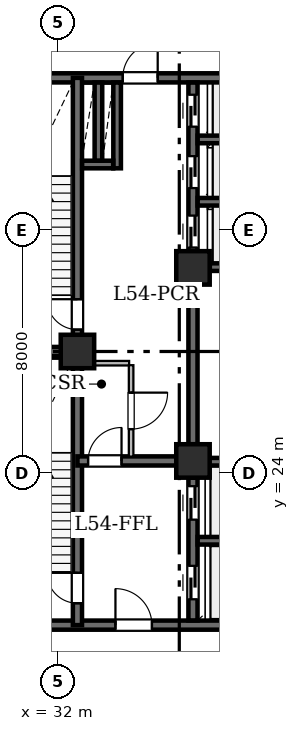
"""IFC4 building model, lengths in metres.
Left out: names, types, materials, properties, quantities, classifications, styles, units other than length and angle.
Written with IfcOpenShell. Run it as: python <this file> out.ifc"""

import sys

from ifc_helpers import new_model, si_unit, direction, frame, frame_2d, origin, origin_2d, place, context, subcontext, project, spatial, rectangle, hollow_rectangle, extrude, element, fill, save


model = new_model("IFC4")
c1 = context("Model", 3, precision=1e-05, world=origin(), true_north=direction((0.0, 1.0)))
c2 = subcontext(c1, "Body", "Model", "MODEL_VIEW")
j1 = project(units=[si_unit("LENGTHUNIT", "METRE"), si_unit("PLANEANGLEUNIT", "RADIAN")], contexts=[c1])
p1 = place(None, origin())
s1 = spatial("IfcSite", under=j1, at=p1, CompositionType="ELEMENT")
p2 = place(p1, origin())
s2 = spatial("IfcBuilding", under=s1, at=p2, CompositionType="ELEMENT")
p3 = place(p2, frame((0.0, 0.0, 211.8)))
s3 = spatial("IfcBuildingStorey", under=s2, at=p3, CompositionType="ELEMENT", Elevation=211.8)
for number, where, z_axis, x_axis in (
    (1, (32.65, 28.0, 0.0), (0.0, 0.0, 1.0), (1.0, 0.0, 0.0)),
    (2, (36.45, 24.4, 0.0), (0.0, 0.0, 1.0), (1.0, 0.0, 0.0)),
    (3, (36.45, 30.75, 0.0), (0.0, 0.0, 1.0), (1.0, 0.0, 0.0)),
):
    element("IfcColumn", number, at=place(p3, frame(where, z_axis=z_axis, x_axis=x_axis)), inside=s3, PredefinedType="COLUMN", context=c2, shape_type="SweptSolid", body=[
        extrude(hollow_rectangle(XDim=1.1, YDim=1.1, WallThickness=0.055, at=origin_2d()), origin(), (0.0, 0.0, 1.0), 5.4),
    ])
p4 = place(p3, frame((29.0, 19.0, 0.0), z_axis=(0.0, 0.0, 1.0), x_axis=(1.0, 0.0, 0.0)))
e4 = element("IfcWall", 4, at=p4, inside=s3, PredefinedType="SHEAR", context=c2, shape_type="SweptSolid", body=[
    extrude(rectangle(XDim=10.4, YDim=0.3, at=frame_2d((5.2, 0.0))), origin(), (0.0, 0.0, 1.0), 4.98),
])
p5 = place(p4, frame((4.9, 0.0, 0.0)))
e5 = element("IfcOpeningElement", 5, at=p5, cuts=e4, PredefinedType="OPENING", context=c2, shape_type="SweptSolid", body=[
    extrude(rectangle(XDim=1.2, YDim=2.15, at=frame_2d((0.6, 1.075))), frame((0.0, 0.16, 0.0), z_axis=(0.0, -1.0, 0.0), x_axis=(1.0, 0.0, 0.0)), (0.0, 0.0, 1.0), 0.32),
])
p6 = place(p3, frame((29.0, 37.0, 0.0), z_axis=(0.0, 0.0, 1.0), x_axis=(1.0, 0.0, 0.0)))
e6 = element("IfcWall", 6, at=p6, inside=s3, PredefinedType="SHEAR", context=c2, shape_type="SweptSolid", body=[
    extrude(rectangle(XDim=10.4, YDim=0.3, at=frame_2d((5.2, 0.0))), origin(), (0.0, 0.0, 1.0), 4.98),
])
p7 = place(p6, frame((5.14, 0.0, 0.0)))
e7 = element("IfcOpeningElement", 7, at=p7, cuts=e6, PredefinedType="OPENING", context=c2, shape_type="SweptSolid", body=[
    extrude(rectangle(XDim=1.15, YDim=2.2, at=frame_2d((0.575, 1.1))), frame((0.0, 0.16, 0.0), z_axis=(0.0, -1.0, 0.0), x_axis=(1.0, 0.0, 0.0)), (0.0, 0.0, 1.0), 0.32),
])
p8 = place(p3, frame((32.65, 19.0, 0.0), z_axis=(0.0, 0.0, 1.0), x_axis=(0.0, 1.0, 0.0)))
e8 = element("IfcWall", 8, at=p8, inside=s3, PredefinedType="SHEAR", context=c2, shape_type="SweptSolid", body=[
    extrude(rectangle(XDim=9.0, YDim=0.3, at=frame_2d((4.5, 0.0))), origin(), (0.0, 0.0, 1.0), 4.98),
])
p9 = place(p8, frame((0.72, 0.0, 0.0)))
e9 = element("IfcOpeningElement", 9, at=p9, cuts=e8, PredefinedType="OPENING", context=c2, shape_type="SweptSolid", body=[
    extrude(rectangle(XDim=1.0, YDim=2.15, at=frame_2d((0.5, 1.075))), frame((0.0, 0.16, 0.0), z_axis=(0.0, -1.0, 0.0), x_axis=(1.0, 0.0, 0.0)), (0.0, 0.0, 1.0), 0.32),
])
p10 = place(p3, frame((32.65, 28.0, 0.0), z_axis=(0.0, 0.0, 1.0), x_axis=(0.0, 1.0, 0.0)))
e10 = element("IfcWall", 10, at=p10, inside=s3, PredefinedType="SHEAR", context=c2, shape_type="SweptSolid", body=[
    extrude(rectangle(XDim=9.0, YDim=0.3, at=frame_2d((4.5, 0.0))), origin(), (0.0, 0.0, 1.0), 4.98),
])
p11 = place(p10, frame((0.72, 0.0, 0.0)))
e11 = element("IfcOpeningElement", 11, at=p11, cuts=e10, PredefinedType="OPENING", context=c2, shape_type="SweptSolid", body=[
    extrude(rectangle(XDim=1.0, YDim=2.15, at=frame_2d((0.5, 1.075))), frame((0.0, 0.16, 0.0), z_axis=(0.0, -1.0, 0.0), x_axis=(1.0, 0.0, 0.0)), (0.0, 0.0, 1.0), 0.32),
])
p12 = place(p3, frame((29.0, 28.0, 0.0), z_axis=(0.0, 0.0, 1.0), x_axis=(1.0, 0.0, 0.0)))
e12 = element("IfcWall", 12, at=p12, inside=s3, PredefinedType="SHEAR", context=c2, shape_type="SweptSolid", body=[
    extrude(rectangle(XDim=3.65, YDim=0.3, at=frame_2d((1.825, 0.0))), origin(), (0.0, 0.0, 1.0), 4.98),
])
p13 = place(p3, frame((32.65, 24.4, 0.0), z_axis=(0.0, 0.0, 1.0), x_axis=(1.0, 0.0, 0.0)))
e13 = element("IfcWall", 13, at=p13, inside=s3, PredefinedType="SHEAR", context=c2, shape_type="SweptSolid", body=[
    extrude(rectangle(XDim=3.8, YDim=0.3, at=frame_2d((1.9, 0.0))), origin(), (0.0, 0.0, 1.0), 4.98),
])
p14 = place(p13, frame((0.35, 0.0, 0.0)))
e14 = element("IfcOpeningElement", 14, at=p14, cuts=e13, PredefinedType="OPENING", context=c2, shape_type="SweptSolid", body=[
    extrude(rectangle(XDim=1.1, YDim=2.15, at=frame_2d((0.55, 1.075))), frame((0.0, 0.16, 0.0), z_axis=(0.0, -1.0, 0.0), x_axis=(1.0, 0.0, 0.0)), (0.0, 0.0, 1.0), 0.32),
])
p15 = place(p3, frame((36.45, 19.154, 0.0), z_axis=(0.0, 0.0, 1.0), x_axis=(0.0, 1.0, 0.0)))
e15 = element("IfcWall", 15, at=p15, inside=s3, PredefinedType="SHEAR", context=c2, shape_type="SweptSolid", body=[
    extrude(rectangle(XDim=4.696, YDim=0.3, at=frame_2d((2.348, 0.0))), origin(), (0.0, 0.0, 1.0), 4.98),
])
p16 = place(p15, frame((0.696, 0.0, 0.0)))
e16 = element("IfcOpeningElement", 16, at=p16, cuts=e15, PredefinedType="OPENING", context=c2, shape_type="SweptSolid", body=[
    extrude(rectangle(XDim=1.1, YDim=2.15, at=frame_2d((0.55, 1.075))), frame((0.0, 0.16, 0.0), z_axis=(0.0, -1.0, 0.0), x_axis=(1.0, 0.0, 0.0)), (0.0, 0.0, 1.0), 0.32),
])
p17 = place(p15, frame((3.316, 0.0, 0.0)))
e17 = element("IfcOpeningElement", 17, at=p17, cuts=e15, PredefinedType="OPENING", context=c2, shape_type="SweptSolid", body=[
    extrude(rectangle(XDim=1.1, YDim=2.15, at=frame_2d((0.55, 1.075))), frame((0.0, 0.16, 0.0), z_axis=(0.0, -1.0, 0.0), x_axis=(1.0, 0.0, 0.0)), (0.0, 0.0, 1.0), 0.32),
])
p18 = place(p3, frame((36.45, 24.95, 0.0), z_axis=(0.0, 0.0, 1.0), x_axis=(0.0, 1.0, 0.0)))
e18 = element("IfcWall", 18, at=p18, inside=s3, PredefinedType="SHEAR", context=c2, shape_type="SweptSolid", body=[
    extrude(rectangle(XDim=5.25, YDim=0.3, at=frame_2d((2.625, 0.0))), origin(), (0.0, 0.0, 1.0), 4.98),
])
p19 = place(p3, frame((36.45, 31.3, 0.0), z_axis=(0.0, 0.0, 1.0), x_axis=(0.0, 1.0, 0.0)))
e19 = element("IfcWall", 19, at=p19, inside=s3, PredefinedType="SHEAR", context=c2, shape_type="SweptSolid", body=[
    extrude(rectangle(XDim=5.546, YDim=0.3, at=frame_2d((2.773, 0.0))), origin(), (0.0, 0.0, 1.0), 4.98),
])
p20 = place(p19, frame((0.12, 0.0, 0.0)))
e20 = element("IfcOpeningElement", 20, at=p20, cuts=e19, PredefinedType="OPENING", context=c2, shape_type="SweptSolid", body=[
    extrude(rectangle(XDim=1.05, YDim=2.15, at=frame_2d((0.525, 1.075))), frame((0.0, 0.16, 0.0), z_axis=(0.0, -1.0, 0.0), x_axis=(1.0, 0.0, 0.0)), (0.0, 0.0, 1.0), 0.32),
])
p21 = place(p19, frame((2.075, 0.0, 0.0)))
e21 = element("IfcOpeningElement", 21, at=p21, cuts=e19, PredefinedType="OPENING", context=c2, shape_type="SweptSolid", body=[
    extrude(rectangle(XDim=1.05, YDim=2.15, at=frame_2d((0.525, 1.075))), frame((0.0, 0.16, 0.0), z_axis=(0.0, -1.0, 0.0), x_axis=(1.0, 0.0, 0.0)), (0.0, 0.0, 1.0), 0.32),
])
p22 = place(p19, frame((4.095, 0.0, 0.0)))
e22 = element("IfcOpeningElement", 22, at=p22, cuts=e19, PredefinedType="OPENING", context=c2, shape_type="SweptSolid", body=[
    extrude(rectangle(XDim=1.05, YDim=2.15, at=frame_2d((0.525, 1.075))), frame((0.0, 0.16, 0.0), z_axis=(0.0, -1.0, 0.0), x_axis=(1.0, 0.0, 0.0)), (0.0, 0.0, 1.0), 0.32),
])
for number, where, z_axis, x_axis in (
    (23, (36.604, 21.775, 0.0), (0.0, 0.0, 1.0), (1.0, 0.0, 0.0)),
    (24, (36.604, 24.375, 0.0), (0.0, 0.0, 1.0), (1.0, 0.0, 0.0)),
):
    element("IfcWall", number, at=place(p3, frame(where, z_axis=z_axis, x_axis=x_axis)), inside=s3, PredefinedType="SHEAR", context=c2, shape_type="SweptSolid", body=[
        extrude(rectangle(XDim=2.642, YDim=0.25, at=frame_2d((1.321, 0.0))), origin(), (0.0, 0.0, 1.0), 4.98),
    ])
p23 = place(p3, frame((37.004, 30.775, 0.0), z_axis=(0.0, 0.0, 1.0), x_axis=(1.0, 0.0, 0.0)))
e25 = element("IfcWall", 25, at=p23, inside=s3, PredefinedType="SHEAR", context=c2, shape_type="SweptSolid", body=[
    extrude(rectangle(XDim=2.242, YDim=0.25, at=frame_2d((1.121, 0.0))), origin(), (0.0, 0.0, 1.0), 4.98),
])
for number, where, z_axis, x_axis in (
    (26, (36.604, 32.925, 0.0), (0.0, 0.0, 1.0), (1.0, 0.0, 0.0)),
    (27, (36.604, 34.975, 0.0), (0.0, 0.0, 1.0), (1.0, 0.0, 0.0)),
):
    element("IfcWall", number, at=place(p3, frame(where, z_axis=z_axis, x_axis=x_axis)), inside=s3, PredefinedType="SHEAR", context=c2, shape_type="SweptSolid", body=[
        extrude(rectangle(XDim=2.642, YDim=0.25, at=frame_2d((1.321, 0.0))), origin(), (0.0, 0.0, 1.0), 4.98),
    ])
p24 = place(p3, frame((33.955, 34.025, 0.0), z_axis=(0.0, 0.0, 1.0), x_axis=(0.0, 1.0, 0.0)))
e28 = element("IfcWall", 28, at=p24, inside=s3, PredefinedType="SHEAR", context=c2, shape_type="SweptSolid", body=[
    extrude(rectangle(XDim=2.821, YDim=0.25, at=frame_2d((1.411, 0.0))), origin(), (0.0, 0.0, 1.0), 4.98),
])
p25 = place(p3, frame((32.804, 34.15, 0.0), z_axis=(0.0, 0.0, 1.0), x_axis=(1.0, 0.0, 0.0)))
e29 = element("IfcWall", 29, at=p25, inside=s3, PredefinedType="SHEAR", context=c2, shape_type="SweptSolid", body=[
    extrude(rectangle(XDim=1.022, YDim=0.25, at=frame_2d((0.511, 0.0))), origin(), (0.0, 0.0, 1.0), 4.98),
])
p26 = place(p3, frame((33.34, 34.279, 0.0), z_axis=(0.0, 0.0, 1.0), x_axis=(0.0, 1.0, 0.0)))
e30 = element("IfcWall", 30, at=p26, inside=s3, PredefinedType="SHEAR", context=c2, shape_type="SweptSolid", body=[
    extrude(rectangle(XDim=2.567, YDim=0.25, at=frame_2d((1.283, 0.0))), origin(), (0.0, 0.0, 1.0), 4.98),
])
p27 = place(p3, frame((32.794, 27.615, 0.0), z_axis=(0.0, 0.0, 1.0), x_axis=(1.0, 0.0, 0.0)))
e31 = element("IfcWall", 31, at=p27, inside=s3, PredefinedType="STANDARD", context=c2, shape_type="SweptSolid", body=[
    extrude(rectangle(XDim=1.556, YDim=0.15, at=frame_2d((0.778, 0.0))), origin(), (0.0, 0.0, 1.0), 4.437),
])
p28 = place(p3, frame((34.415, 27.55, 0.0), z_axis=(0.0, 0.0, 1.0), x_axis=(0.0, -1.0, 0.0)))
e32 = element("IfcWall", 32, at=p28, inside=s3, PredefinedType="STANDARD", context=c2, shape_type="SweptSolid", body=[
    extrude(rectangle(XDim=3.006, YDim=0.15, at=frame_2d((1.503, 0.0))), origin(), (0.0, 0.0, 1.0), 4.98),
])
p29 = place(p28, frame((0.903, 0.0, 0.0)))
e33 = element("IfcOpeningElement", 33, at=p29, cuts=e32, PredefinedType="OPENING", context=c2, shape_type="SweptSolid", body=[
    extrude(rectangle(XDim=1.2, YDim=2.15, at=frame_2d((0.6, 1.075))), frame((0.0, 0.085, 0.0), z_axis=(0.0, -1.0, 0.0), x_axis=(1.0, 0.0, 0.0)), (0.0, 0.0, 1.0), 0.17),
])
p30 = place(p9, origin())
e34 = element("IfcDoor", 34, at=p30, inside=s3, OperationType="SINGLE_SWING_RIGHT", PredefinedType="DOOR", context=c2, shape_type="SweptSolid", body=[
    extrude(rectangle(XDim=1.0, YDim=2.15, at=frame_2d((0.5, 1.075))), frame((0.0, 0.025, 0.0), z_axis=(0.0, -1.0, 0.0), x_axis=(1.0, 0.0, 0.0)), (0.0, 0.0, 1.0), 0.05),
])
fill(e9, e34)
p31 = place(p11, origin())
e35 = element("IfcDoor", 35, at=p31, inside=s3, OperationType="SINGLE_SWING_RIGHT", PredefinedType="DOOR", context=c2, shape_type="SweptSolid", body=[
    extrude(rectangle(XDim=1.0, YDim=2.15, at=frame_2d((0.5, 1.075))), frame((0.0, 0.025, 0.0), z_axis=(0.0, -1.0, 0.0), x_axis=(1.0, 0.0, 0.0)), (0.0, 0.0, 1.0), 0.05),
])
fill(e11, e35)
p32 = place(p14, origin())
e36 = element("IfcDoor", 36, at=p32, inside=s3, OperationType="SINGLE_SWING_RIGHT", PredefinedType="DOOR", context=c2, shape_type="SweptSolid", body=[
    extrude(rectangle(XDim=1.1, YDim=2.15, at=frame_2d((0.55, 1.075))), frame((0.0, 0.025, 0.0), z_axis=(0.0, -1.0, 0.0), x_axis=(1.0, 0.0, 0.0)), (0.0, 0.0, 1.0), 0.05),
])
fill(e14, e36)
p33 = place(p5, origin())
e37 = element("IfcDoor", 37, at=p33, inside=s3, OperationType="SINGLE_SWING_LEFT", PredefinedType="DOOR", context=c2, shape_type="SweptSolid", body=[
    extrude(rectangle(XDim=1.2, YDim=2.15, at=frame_2d((0.6, 1.075))), frame((0.0, 0.025, 0.0), z_axis=(0.0, -1.0, 0.0), x_axis=(1.0, 0.0, 0.0)), (0.0, 0.0, 1.0), 0.05),
])
fill(e5, e37)
p34 = place(p7, origin())
e38 = element("IfcDoor", 38, at=p34, inside=s3, OperationType="SINGLE_SWING_RIGHT", PredefinedType="DOOR", context=c2, shape_type="SweptSolid", body=[
    extrude(rectangle(XDim=1.15, YDim=2.2, at=frame_2d((0.575, 1.1))), frame((0.0, 0.025, 0.0), z_axis=(0.0, -1.0, 0.0), x_axis=(1.0, 0.0, 0.0)), (0.0, 0.0, 1.0), 0.05),
])
fill(e7, e38)
p35 = place(p16, origin())
e39 = element("IfcDoor", 39, at=p35, inside=s3, OperationType="SLIDING_TO_LEFT", PredefinedType="DOOR", context=c2, shape_type="SweptSolid", body=[
    extrude(rectangle(XDim=1.1, YDim=2.15, at=frame_2d((0.55, 1.075))), frame((0.0, 0.025, 0.0), z_axis=(0.0, -1.0, 0.0), x_axis=(1.0, 0.0, 0.0)), (0.0, 0.0, 1.0), 0.05),
])
fill(e16, e39)
p36 = place(p17, origin())
e40 = element("IfcDoor", 40, at=p36, inside=s3, OperationType="SLIDING_TO_LEFT", PredefinedType="DOOR", context=c2, shape_type="SweptSolid", body=[
    extrude(rectangle(XDim=1.1, YDim=2.15, at=frame_2d((0.55, 1.075))), frame((0.0, 0.025, 0.0), z_axis=(0.0, -1.0, 0.0), x_axis=(1.0, 0.0, 0.0)), (0.0, 0.0, 1.0), 0.05),
])
fill(e17, e40)
p37 = place(p20, origin())
e41 = element("IfcDoor", 41, at=p37, inside=s3, OperationType="SLIDING_TO_LEFT", PredefinedType="DOOR", context=c2, shape_type="SweptSolid", body=[
    extrude(rectangle(XDim=1.05, YDim=2.15, at=frame_2d((0.525, 1.075))), frame((0.0, 0.025, 0.0), z_axis=(0.0, -1.0, 0.0), x_axis=(1.0, 0.0, 0.0)), (0.0, 0.0, 1.0), 0.05),
])
fill(e20, e41)
p38 = place(p21, origin())
e42 = element("IfcDoor", 42, at=p38, inside=s3, OperationType="SLIDING_TO_LEFT", PredefinedType="DOOR", context=c2, shape_type="SweptSolid", body=[
    extrude(rectangle(XDim=1.05, YDim=2.15, at=frame_2d((0.525, 1.075))), frame((0.0, 0.025, 0.0), z_axis=(0.0, -1.0, 0.0), x_axis=(1.0, 0.0, 0.0)), (0.0, 0.0, 1.0), 0.05),
])
fill(e21, e42)
p39 = place(p22, origin())
e43 = element("IfcDoor", 43, at=p39, inside=s3, OperationType="SLIDING_TO_LEFT", PredefinedType="DOOR", context=c2, shape_type="SweptSolid", body=[
    extrude(rectangle(XDim=1.05, YDim=2.15, at=frame_2d((0.525, 1.075))), frame((0.0, 0.025, 0.0), z_axis=(0.0, -1.0, 0.0), x_axis=(1.0, 0.0, 0.0)), (0.0, 0.0, 1.0), 0.05),
])
fill(e22, e43)
p40 = place(p29, origin())
e44 = element("IfcDoor", 44, at=p40, inside=s3, OperationType="SINGLE_SWING_LEFT", PredefinedType="DOOR", context=c2, shape_type="SweptSolid", body=[
    extrude(rectangle(XDim=1.2, YDim=2.15, at=frame_2d((0.6, 1.075))), frame((0.0, 0.025, 0.0), z_axis=(0.0, -1.0, 0.0), x_axis=(1.0, 0.0, 0.0)), (0.0, 0.0, 1.0), 0.05),
])
fill(e33, e44)
save(model, sys.argv[1])
